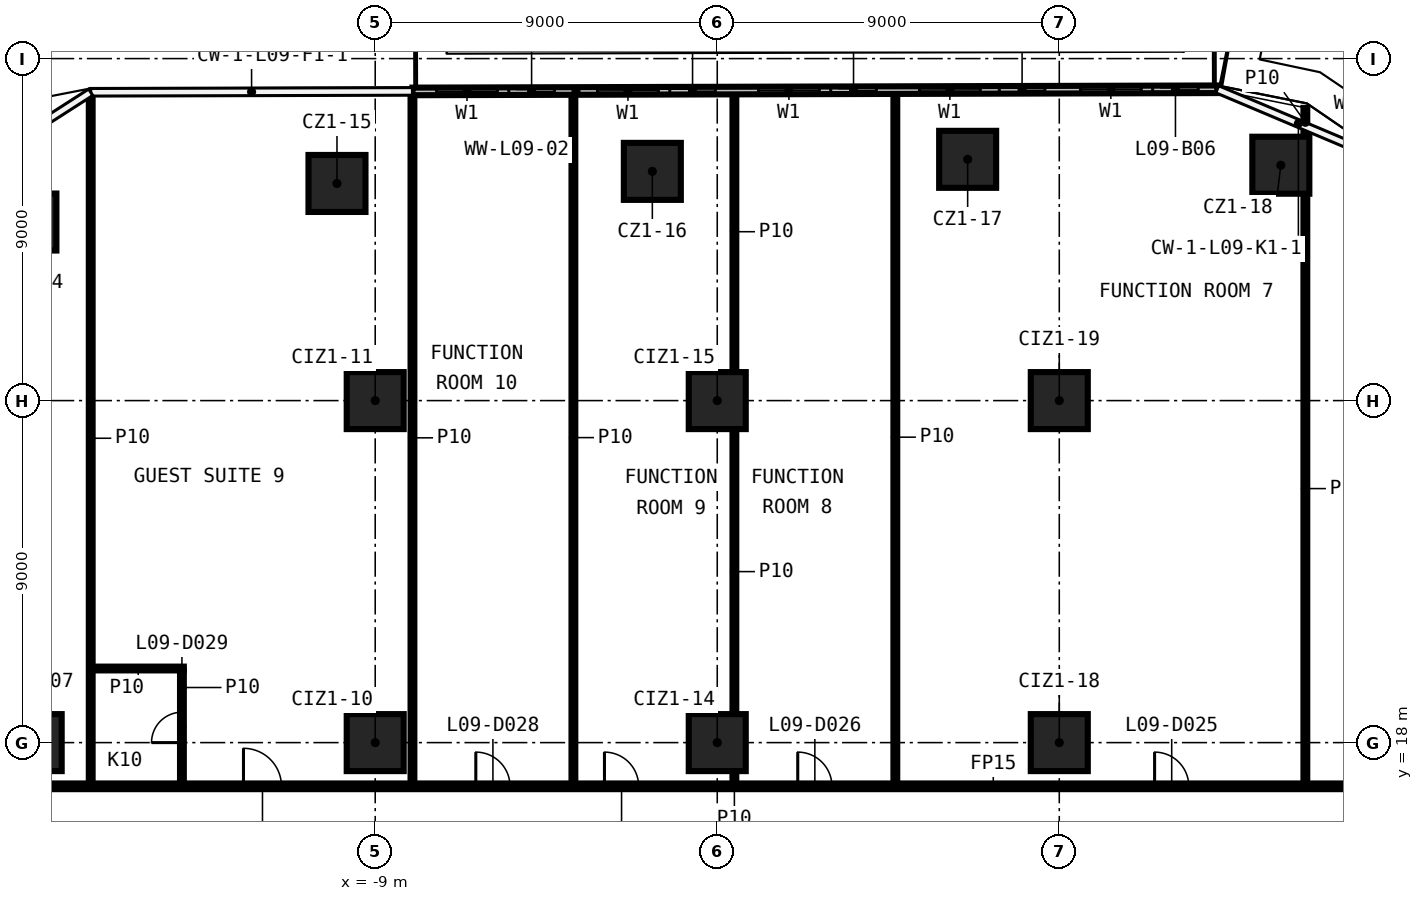
"""IFC4 building model, lengths in metres.
Left out: names, types, materials, properties, quantities, classifications, styles, units other than length and angle.
Written with IfcOpenShell. Run it as: python <this file> out.ifc"""

import sys

from ifc_helpers import new_model, si_unit, direction, frame, frame_2d, origin, origin_2d, place, context, subcontext, project, spatial, rectangle, extrude, element, fill, save


model = new_model("IFC4")
c1 = context("Model", 3, precision=1e-05, world=origin(), true_north=direction((0.0, 1.0)))
c2 = subcontext(c1, "Body", "Model", "MODEL_VIEW")
j1 = project(units=[si_unit("LENGTHUNIT", "METRE"), si_unit("PLANEANGLEUNIT", "RADIAN")], contexts=[c1])
p1 = place(None, origin())
s1 = spatial("IfcSite", under=j1, at=p1, CompositionType="ELEMENT")
p2 = place(p1, origin())
s2 = spatial("IfcBuilding", under=s1, at=p2, CompositionType="ELEMENT")
p3 = place(p2, frame((0.0, 0.0, 55.1)))
s3 = spatial("IfcBuildingStorey", under=s2, at=p3, CompositionType="ELEMENT", Elevation=55.1)
for number, where, z_axis, x_axis in (
    (1, (-18.139, 31.699, 0.0), (0.0, 0.0, 1.0), (1.0, 0.0, 0.0)),
    (2, (-10.006, 32.714, 0.0), (0.0, 0.0, 1.0), (1.0, 0.0, 0.0)),
    (3, (-1.708, 33.032, 0.0), (0.0, 0.0, 1.0), (1.0, 0.0, 0.0)),
    (4, (6.589, 33.349, 0.0), (0.0, 0.0, 1.0), (1.0, 0.0, 0.0)),
    (5, (14.83, 33.194, 0.0), (0.0, 0.0, 1.0), (1.0, 0.0, 0.0)),
    (6, (-18.0, 18.0, 0.0), (0.0, 0.0, 1.0), (1.0, 0.0, 0.0)),
    (7, (-9.0, 18.0, 0.0), (0.0, 0.0, 1.0), (1.0, 0.0, 0.0)),
    (8, (-9.0, 27.0, 0.0), (0.0, 0.0, 1.0), (1.0, 0.0, 0.0)),
    (9, (0.0, 18.0, 0.0), (0.0, 0.0, 1.0), (1.0, 0.0, 0.0)),
    (10, (0.0, 27.0, 0.0), (0.0, 0.0, 1.0), (1.0, 0.0, 0.0)),
    (11, (9.0, 18.0, 0.0), (0.0, 0.0, 1.0), (1.0, 0.0, 0.0)),
    (12, (9.0, 27.0, 0.0), (0.0, 0.0, 1.0), (1.0, 0.0, 0.0)),
):
    element("IfcColumn", number, at=place(p3, frame(where, z_axis=z_axis, x_axis=x_axis)), inside=s3, PredefinedType="COLUMN", context=c2, shape_type="SweptSolid", body=[
        extrude(rectangle(XDim=1.5, YDim=1.5, at=origin_2d()), origin(), (0.0, 0.0, 1.0), 3.3),
    ])
p4 = place(p3, frame((-19.925, 16.85, 0.0), z_axis=(0.0, 0.0, 1.0), x_axis=(1.0, 0.0, 0.0)))
e13 = element("IfcWall", 13, at=p4, inside=s3, PredefinedType="PARTITIONING", context=c2, shape_type="SweptSolid", body=[
    extrude(rectangle(XDim=39.85, YDim=0.15, at=frame_2d((19.925, 0.0))), origin(), (0.0, 0.0, 1.0), 3.3),
])
p5 = place(p4, frame((31.433, 0.0, 0.0)))
e14 = element("IfcOpeningElement", 14, at=p5, cuts=e13, PredefinedType="OPENING", context=c2, shape_type="SweptSolid", body=[
    extrude(rectangle(XDim=0.9, YDim=2.1, at=frame_2d((0.45, 1.05))), frame((0.0, 0.085, 0.0), z_axis=(0.0, -1.0, 0.0), x_axis=(1.0, 0.0, 0.0)), (0.0, 0.0, 1.0), 0.17),
])
p6 = place(p4, frame((22.043, 0.0, 0.0)))
e15 = element("IfcOpeningElement", 15, at=p6, cuts=e13, PredefinedType="OPENING", context=c2, shape_type="SweptSolid", body=[
    extrude(rectangle(XDim=0.9, YDim=2.1, at=frame_2d((0.45, 1.05))), frame((0.0, 0.085, 0.0), z_axis=(0.0, -1.0, 0.0), x_axis=(1.0, 0.0, 0.0)), (0.0, 0.0, 1.0), 0.17),
])
p7 = place(p4, frame((16.957, 0.0, 0.0)))
e16 = element("IfcOpeningElement", 16, at=p7, cuts=e13, PredefinedType="OPENING", context=c2, shape_type="SweptSolid", body=[
    extrude(rectangle(XDim=0.9, YDim=2.1, at=frame_2d((0.45, 1.05))), frame((0.0, 0.085, 0.0), z_axis=(0.0, -1.0, 0.0), x_axis=(1.0, 0.0, 0.0)), (0.0, 0.0, 1.0), 0.17),
])
p8 = place(p4, frame((13.572, 0.0, 0.0)))
e17 = element("IfcOpeningElement", 17, at=p8, cuts=e13, PredefinedType="OPENING", context=c2, shape_type="SweptSolid", body=[
    extrude(rectangle(XDim=0.9, YDim=2.1, at=frame_2d((0.45, 1.05))), frame((0.0, 0.085, 0.0), z_axis=(0.0, -1.0, 0.0), x_axis=(1.0, 0.0, 0.0)), (0.0, 0.0, 1.0), 0.17),
])
p9 = place(p4, frame((7.458, 0.0, 0.0)))
e18 = element("IfcOpeningElement", 18, at=p9, cuts=e13, PredefinedType="OPENING", context=c2, shape_type="SweptSolid", body=[
    extrude(rectangle(XDim=1.0, YDim=2.1, at=frame_2d((0.5, 1.05))), frame((0.0, 0.085, 0.0), z_axis=(0.0, -1.0, 0.0), x_axis=(1.0, 0.0, 0.0)), (0.0, 0.0, 1.0), 0.17),
])
p10 = place(p3, frame((-16.436, 19.95, 0.0), z_axis=(0.0, 0.0, 1.0), x_axis=(1.0, 0.0, 0.0)))
e19 = element("IfcWall", 19, at=p10, inside=s3, PredefinedType="PARTITIONING", context=c2, shape_type="SweptSolid", body=[
    extrude(rectangle(XDim=2.4, YDim=0.1, at=frame_2d((1.2, 0.0))), origin(), (0.0, 0.0, 1.0), 3.3),
])
p11 = place(p3, frame((15.475, 16.925, 0.0), z_axis=(0.0, 0.0, 1.0), x_axis=(0.0, 1.0, 0.0)))
e20 = element("IfcWall", 20, at=p11, inside=s3, PredefinedType="PARTITIONING", context=c2, shape_type="SweptSolid", body=[
    extrude(rectangle(XDim=15.519, YDim=0.1, at=frame_2d((7.76, 0.0))), origin(), (0.0, 0.0, 1.0), 3.3),
])
p12 = place(p3, frame((15.475, 33.944, 0.0), z_axis=(0.0, 0.0, 1.0), x_axis=(0.0, 1.0, 0.0)))
e21 = element("IfcWall", 21, at=p12, inside=s3, PredefinedType="PARTITIONING", context=c2, shape_type="SweptSolid", body=[
    extrude(rectangle(XDim=0.759, YDim=0.1, at=frame_2d((0.379, 0.0))), origin(), (0.0, 0.0, 1.0), 3.3),
])
p13 = place(p3, frame((4.686, 16.925, 0.0), z_axis=(0.0, 0.0, 1.0), x_axis=(0.0, 1.0, 0.0)))
e22 = element("IfcWall", 22, at=p13, inside=s3, PredefinedType="PARTITIONING", context=c2, shape_type="SweptSolid", body=[
    extrude(rectangle(XDim=18.225, YDim=0.1, at=frame_2d((9.112, 0.0))), origin(), (0.0, 0.0, 1.0), 3.3),
])
p14 = place(p3, frame((0.451, 16.925, 0.0), z_axis=(0.0, 0.0, 1.0), x_axis=(0.0, 1.0, 0.0)))
e23 = element("IfcWall", 23, at=p14, inside=s3, PredefinedType="PARTITIONING", context=c2, shape_type="SweptSolid", body=[
    extrude(rectangle(XDim=0.325, YDim=0.1, at=frame_2d((0.163, 0.0))), origin(), (0.0, 0.0, 1.0), 3.3),
])
p15 = place(p3, frame((0.451, 18.75, 0.0), z_axis=(0.0, 0.0, 1.0), x_axis=(0.0, 1.0, 0.0)))
e24 = element("IfcWall", 24, at=p15, inside=s3, PredefinedType="PARTITIONING", context=c2, shape_type="SweptSolid", body=[
    extrude(rectangle(XDim=7.5, YDim=0.1, at=frame_2d((3.75, 0.0))), origin(), (0.0, 0.0, 1.0), 3.3),
])
p16 = place(p3, frame((0.451, 27.75, 0.0), z_axis=(0.0, 0.0, 1.0), x_axis=(0.0, 1.0, 0.0)))
e25 = element("IfcWall", 25, at=p16, inside=s3, PredefinedType="PARTITIONING", context=c2, shape_type="SweptSolid", body=[
    extrude(rectangle(XDim=7.389, YDim=0.1, at=frame_2d((3.694, 0.0))), origin(), (0.0, 0.0, 1.0), 3.3),
])
p17 = place(p3, frame((-3.785, 16.925, 0.0), z_axis=(0.0, 0.0, 1.0), x_axis=(0.0, 1.0, 0.0)))
e26 = element("IfcWall", 26, at=p17, inside=s3, PredefinedType="PARTITIONING", context=c2, shape_type="SweptSolid", body=[
    extrude(rectangle(XDim=18.202, YDim=0.1, at=frame_2d((9.101, 0.0))), origin(), (0.0, 0.0, 1.0), 3.3),
])
p18 = place(p3, frame((-8.02, 16.925, 0.0), z_axis=(0.0, 0.0, 1.0), x_axis=(0.0, 1.0, 0.0)))
e27 = element("IfcWall", 27, at=p18, inside=s3, PredefinedType="PARTITIONING", context=c2, shape_type="SweptSolid", body=[
    extrude(rectangle(XDim=18.191, YDim=0.1, at=frame_2d((9.096, 0.0))), origin(), (0.0, 0.0, 1.0), 3.3),
])
p19 = place(p3, frame((-14.086, 16.925, 0.0), z_axis=(0.0, 0.0, 1.0), x_axis=(0.0, 1.0, 0.0)))
e28 = element("IfcWall", 28, at=p19, inside=s3, PredefinedType="PARTITIONING", context=c2, shape_type="SweptSolid", body=[
    extrude(rectangle(XDim=2.975, YDim=0.1, at=frame_2d((1.487, 0.0))), origin(), (0.0, 0.0, 1.0), 3.3),
])
p20 = place(p19, frame((1.075, 0.0, 0.0)))
e29 = element("IfcOpeningElement", 29, at=p20, cuts=e28, PredefinedType="OPENING", context=c2, shape_type="SweptSolid", body=[
    extrude(rectangle(XDim=0.8, YDim=2.1, at=frame_2d((0.4, 1.05))), frame((0.0, 0.06, 0.0), z_axis=(0.0, -1.0, 0.0), x_axis=(1.0, 0.0, 0.0)), (0.0, 0.0, 1.0), 0.12),
])
p21 = place(p3, frame((-16.486, 16.925, 0.0), z_axis=(0.0, 0.0, 1.0), x_axis=(0.0, 1.0, 0.0)))
e30 = element("IfcWall", 30, at=p21, inside=s3, PredefinedType="PARTITIONING", context=c2, shape_type="SweptSolid", body=[
    extrude(rectangle(XDim=18.168, YDim=0.1, at=frame_2d((9.084, 0.0))), origin(), (0.0, 0.0, 1.0), 3.3),
])
p22 = place(p3, frame((13.157, 35.193, 0.0), z_axis=(0.0, 0.0, 1.0), x_axis=(-0.99999645413, -0.00266302965, 0.0)))
e31 = element("IfcWall", 31, at=p22, inside=s3, PredefinedType="SOLIDWALL", context=c2, shape_type="SweptSolid", body=[
    extrude(rectangle(XDim=21.177, YDim=0.2, at=frame_2d((10.589, 0.0))), origin(), (0.0, 0.0, 1.0), 3.3),
])
p23 = place(p22, frame((2.0, 0.0, 0.6)))
e32 = element("IfcOpeningElement", 32, at=p23, cuts=e31, PredefinedType="OPENING", context=c2, shape_type="SweptSolid", body=[
    extrude(rectangle(XDim=1.6, YDim=2.4, at=frame_2d((0.8, 1.2))), frame((0.0, 0.11, 0.0), z_axis=(0.0, -1.0, 0.0), x_axis=(1.0, 0.0, 0.0)), (0.0, 0.0, 1.0), 0.22),
])
p24 = place(p22, frame((0.5, 0.0, 0.0)))
e33 = element("IfcOpeningElement", 33, at=p24, cuts=e31, PredefinedType="OPENING", context=c2, shape_type="SweptSolid", body=[
    extrude(rectangle(XDim=1.2, YDim=2.4, at=frame_2d((0.6, 1.2))), frame((0.0, 0.11, 0.0), z_axis=(0.0, -1.0, 0.0), x_axis=(1.0, 0.0, 0.0)), (0.0, 0.0, 1.0), 0.22),
])
p25 = place(p22, frame((6.236, 0.0, 0.6)))
e34 = element("IfcOpeningElement", 34, at=p25, cuts=e31, PredefinedType="OPENING", context=c2, shape_type="SweptSolid", body=[
    extrude(rectangle(XDim=1.6, YDim=2.4, at=frame_2d((0.8, 1.2))), frame((0.0, 0.11, 0.0), z_axis=(0.0, -1.0, 0.0), x_axis=(1.0, 0.0, 0.0)), (0.0, 0.0, 1.0), 0.22),
])
p26 = place(p22, frame((4.535, 0.0, 0.0)))
e35 = element("IfcOpeningElement", 35, at=p26, cuts=e31, PredefinedType="OPENING", context=c2, shape_type="SweptSolid", body=[
    extrude(rectangle(XDim=1.2, YDim=2.4, at=frame_2d((0.6, 1.2))), frame((0.0, 0.11, 0.0), z_axis=(0.0, -1.0, 0.0), x_axis=(1.0, 0.0, 0.0)), (0.0, 0.0, 1.0), 0.22),
])
p27 = place(p22, frame((10.471, 0.0, 0.6)))
e36 = element("IfcOpeningElement", 36, at=p27, cuts=e31, PredefinedType="OPENING", context=c2, shape_type="SweptSolid", body=[
    extrude(rectangle(XDim=1.6, YDim=2.4, at=frame_2d((0.8, 1.2))), frame((0.0, 0.11, 0.0), z_axis=(0.0, -1.0, 0.0), x_axis=(1.0, 0.0, 0.0)), (0.0, 0.0, 1.0), 0.22),
])
p28 = place(p22, frame((8.971, 0.0, 0.0)))
e37 = element("IfcOpeningElement", 37, at=p28, cuts=e31, PredefinedType="OPENING", context=c2, shape_type="SweptSolid", body=[
    extrude(rectangle(XDim=1.2, YDim=2.4, at=frame_2d((0.6, 1.2))), frame((0.0, 0.11, 0.0), z_axis=(0.0, -1.0, 0.0), x_axis=(1.0, 0.0, 0.0)), (0.0, 0.0, 1.0), 0.22),
])
p29 = place(p22, frame((14.707, 0.0, 0.6)))
e38 = element("IfcOpeningElement", 38, at=p29, cuts=e31, PredefinedType="OPENING", context=c2, shape_type="SweptSolid", body=[
    extrude(rectangle(XDim=1.6, YDim=2.4, at=frame_2d((0.8, 1.2))), frame((0.0, 0.11, 0.0), z_axis=(0.0, -1.0, 0.0), x_axis=(1.0, 0.0, 0.0)), (0.0, 0.0, 1.0), 0.22),
])
p30 = place(p22, frame((13.207, 0.0, 0.0)))
e39 = element("IfcOpeningElement", 39, at=p30, cuts=e31, PredefinedType="OPENING", context=c2, shape_type="SweptSolid", body=[
    extrude(rectangle(XDim=1.2, YDim=2.4, at=frame_2d((0.6, 1.2))), frame((0.0, 0.11, 0.0), z_axis=(0.0, -1.0, 0.0), x_axis=(1.0, 0.0, 0.0)), (0.0, 0.0, 1.0), 0.22),
])
p31 = place(p22, frame((18.942, 0.0, 0.6)))
e40 = element("IfcOpeningElement", 40, at=p31, cuts=e31, PredefinedType="OPENING", context=c2, shape_type="SweptSolid", body=[
    extrude(rectangle(XDim=1.6, YDim=2.4, at=frame_2d((0.8, 1.2))), frame((0.0, 0.11, 0.0), z_axis=(0.0, -1.0, 0.0), x_axis=(1.0, 0.0, 0.0)), (0.0, 0.0, 1.0), 0.22),
])
p32 = place(p22, frame((17.442, 0.0, 0.0)))
e41 = element("IfcOpeningElement", 41, at=p32, cuts=e31, PredefinedType="OPENING", context=c2, shape_type="SweptSolid", body=[
    extrude(rectangle(XDim=1.2, YDim=2.4, at=frame_2d((0.6, 1.2))), frame((0.0, 0.11, 0.0), z_axis=(0.0, -1.0, 0.0), x_axis=(1.0, 0.0, 0.0)), (0.0, 0.0, 1.0), 0.22),
])
p33 = place(p5, origin())
e42 = element("IfcDoor", 42, at=p33, inside=s3, OperationType="SINGLE_SWING_LEFT", PredefinedType="DOOR", context=c2, shape_type="SweptSolid", body=[
    extrude(rectangle(XDim=0.9, YDim=2.1, at=frame_2d((0.45, 1.05))), frame((0.0, 0.025, 0.0), z_axis=(0.0, -1.0, 0.0), x_axis=(1.0, 0.0, 0.0)), (0.0, 0.0, 1.0), 0.05),
])
fill(e14, e42)
p34 = place(p6, origin())
e43 = element("IfcDoor", 43, at=p34, inside=s3, OperationType="SINGLE_SWING_RIGHT", PredefinedType="DOOR", context=c2, shape_type="SweptSolid", body=[
    extrude(rectangle(XDim=0.9, YDim=2.1, at=frame_2d((0.45, 1.05))), frame((0.0, 0.025, 0.0), z_axis=(0.0, -1.0, 0.0), x_axis=(1.0, 0.0, 0.0)), (0.0, 0.0, 1.0), 0.05),
])
fill(e15, e43)
p35 = place(p7, origin())
e44 = element("IfcDoor", 44, at=p35, inside=s3, OperationType="SINGLE_SWING_LEFT", PredefinedType="DOOR", context=c2, shape_type="SweptSolid", body=[
    extrude(rectangle(XDim=0.9, YDim=2.1, at=frame_2d((0.45, 1.05))), frame((0.0, 0.025, 0.0), z_axis=(0.0, -1.0, 0.0), x_axis=(1.0, 0.0, 0.0)), (0.0, 0.0, 1.0), 0.05),
])
fill(e16, e44)
p36 = place(p8, origin())
e45 = element("IfcDoor", 45, at=p36, inside=s3, OperationType="SINGLE_SWING_RIGHT", PredefinedType="DOOR", context=c2, shape_type="SweptSolid", body=[
    extrude(rectangle(XDim=0.9, YDim=2.1, at=frame_2d((0.45, 1.05))), frame((0.0, 0.025, 0.0), z_axis=(0.0, -1.0, 0.0), x_axis=(1.0, 0.0, 0.0)), (0.0, 0.0, 1.0), 0.05),
])
fill(e17, e45)
p37 = place(p20, origin())
e46 = element("IfcDoor", 46, at=p37, inside=s3, OperationType="SINGLE_SWING_RIGHT", PredefinedType="DOOR", context=c2, shape_type="SweptSolid", body=[
    extrude(rectangle(XDim=0.8, YDim=2.1, at=frame_2d((0.4, 1.05))), frame((0.0, 0.025, 0.0), z_axis=(0.0, -1.0, 0.0), x_axis=(1.0, 0.0, 0.0)), (0.0, 0.0, 1.0), 0.05),
])
fill(e29, e46)
p38 = place(p9, origin())
e47 = element("IfcDoor", 47, at=p38, inside=s3, OperationType="SINGLE_SWING_LEFT", PredefinedType="DOOR", context=c2, shape_type="SweptSolid", body=[
    extrude(rectangle(XDim=1.0, YDim=2.1, at=frame_2d((0.5, 1.05))), frame((0.0, 0.025, 0.0), z_axis=(0.0, -1.0, 0.0), x_axis=(1.0, 0.0, 0.0)), (0.0, 0.0, 1.0), 0.05),
])
fill(e18, e47)
p39 = place(p23, origin())
e48 = element("IfcWindow", 48, at=p39, inside=s3, PartitioningType="SINGLE_PANEL", PredefinedType="WINDOW", context=c2, shape_type="SweptSolid", body=[
    extrude(rectangle(XDim=1.6, YDim=2.4, at=frame_2d((0.8, 1.2))), frame((0.0, 0.03, 0.0), z_axis=(0.0, -1.0, 0.0), x_axis=(1.0, 0.0, 0.0)), (0.0, 0.0, 1.0), 0.06),
])
fill(e32, e48)
p40 = place(p24, origin())
e49 = element("IfcDoor", 49, at=p40, inside=s3, OperationType="SLIDING_TO_LEFT", PredefinedType="DOOR", context=c2, shape_type="SweptSolid", body=[
    extrude(rectangle(XDim=1.2, YDim=2.4, at=frame_2d((0.6, 1.2))), frame((0.0, 0.025, 0.0), z_axis=(0.0, -1.0, 0.0), x_axis=(1.0, 0.0, 0.0)), (0.0, 0.0, 1.0), 0.05),
])
fill(e33, e49)
p41 = place(p25, origin())
e50 = element("IfcWindow", 50, at=p41, inside=s3, PartitioningType="SINGLE_PANEL", PredefinedType="WINDOW", context=c2, shape_type="SweptSolid", body=[
    extrude(rectangle(XDim=1.6, YDim=2.4, at=frame_2d((0.8, 1.2))), frame((0.0, 0.03, 0.0), z_axis=(0.0, -1.0, 0.0), x_axis=(1.0, 0.0, 0.0)), (0.0, 0.0, 1.0), 0.06),
])
fill(e34, e50)
p42 = place(p26, origin())
e51 = element("IfcDoor", 51, at=p42, inside=s3, OperationType="SLIDING_TO_LEFT", PredefinedType="DOOR", context=c2, shape_type="SweptSolid", body=[
    extrude(rectangle(XDim=1.2, YDim=2.4, at=frame_2d((0.6, 1.2))), frame((0.0, 0.025, 0.0), z_axis=(0.0, -1.0, 0.0), x_axis=(1.0, 0.0, 0.0)), (0.0, 0.0, 1.0), 0.05),
])
fill(e35, e51)
p43 = place(p27, origin())
e52 = element("IfcWindow", 52, at=p43, inside=s3, PartitioningType="SINGLE_PANEL", PredefinedType="WINDOW", context=c2, shape_type="SweptSolid", body=[
    extrude(rectangle(XDim=1.6, YDim=2.4, at=frame_2d((0.8, 1.2))), frame((0.0, 0.03, 0.0), z_axis=(0.0, -1.0, 0.0), x_axis=(1.0, 0.0, 0.0)), (0.0, 0.0, 1.0), 0.06),
])
fill(e36, e52)
p44 = place(p28, origin())
e53 = element("IfcDoor", 53, at=p44, inside=s3, OperationType="SLIDING_TO_LEFT", PredefinedType="DOOR", context=c2, shape_type="SweptSolid", body=[
    extrude(rectangle(XDim=1.2, YDim=2.4, at=frame_2d((0.6, 1.2))), frame((0.0, 0.025, 0.0), z_axis=(0.0, -1.0, 0.0), x_axis=(1.0, 0.0, 0.0)), (0.0, 0.0, 1.0), 0.05),
])
fill(e37, e53)
p45 = place(p29, origin())
e54 = element("IfcWindow", 54, at=p45, inside=s3, PartitioningType="SINGLE_PANEL", PredefinedType="WINDOW", context=c2, shape_type="SweptSolid", body=[
    extrude(rectangle(XDim=1.6, YDim=2.4, at=frame_2d((0.8, 1.2))), frame((0.0, 0.03, 0.0), z_axis=(0.0, -1.0, 0.0), x_axis=(1.0, 0.0, 0.0)), (0.0, 0.0, 1.0), 0.06),
])
fill(e38, e54)
p46 = place(p30, origin())
e55 = element("IfcDoor", 55, at=p46, inside=s3, OperationType="SLIDING_TO_LEFT", PredefinedType="DOOR", context=c2, shape_type="SweptSolid", body=[
    extrude(rectangle(XDim=1.2, YDim=2.4, at=frame_2d((0.6, 1.2))), frame((0.0, 0.025, 0.0), z_axis=(0.0, -1.0, 0.0), x_axis=(1.0, 0.0, 0.0)), (0.0, 0.0, 1.0), 0.05),
])
fill(e39, e55)
p47 = place(p31, origin())
e56 = element("IfcWindow", 56, at=p47, inside=s3, PartitioningType="SINGLE_PANEL", PredefinedType="WINDOW", context=c2, shape_type="SweptSolid", body=[
    extrude(rectangle(XDim=1.6, YDim=2.4, at=frame_2d((0.8, 1.2))), frame((0.0, 0.03, 0.0), z_axis=(0.0, -1.0, 0.0), x_axis=(1.0, 0.0, 0.0)), (0.0, 0.0, 1.0), 0.06),
])
fill(e40, e56)
p48 = place(p32, origin())
e57 = element("IfcDoor", 57, at=p48, inside=s3, OperationType="SLIDING_TO_LEFT", PredefinedType="DOOR", context=c2, shape_type="SweptSolid", body=[
    extrude(rectangle(XDim=1.2, YDim=2.4, at=frame_2d((0.6, 1.2))), frame((0.0, 0.025, 0.0), z_axis=(0.0, -1.0, 0.0), x_axis=(1.0, 0.0, 0.0)), (0.0, 0.0, 1.0), 0.05),
])
fill(e41, e57)
save(model, sys.argv[1])
